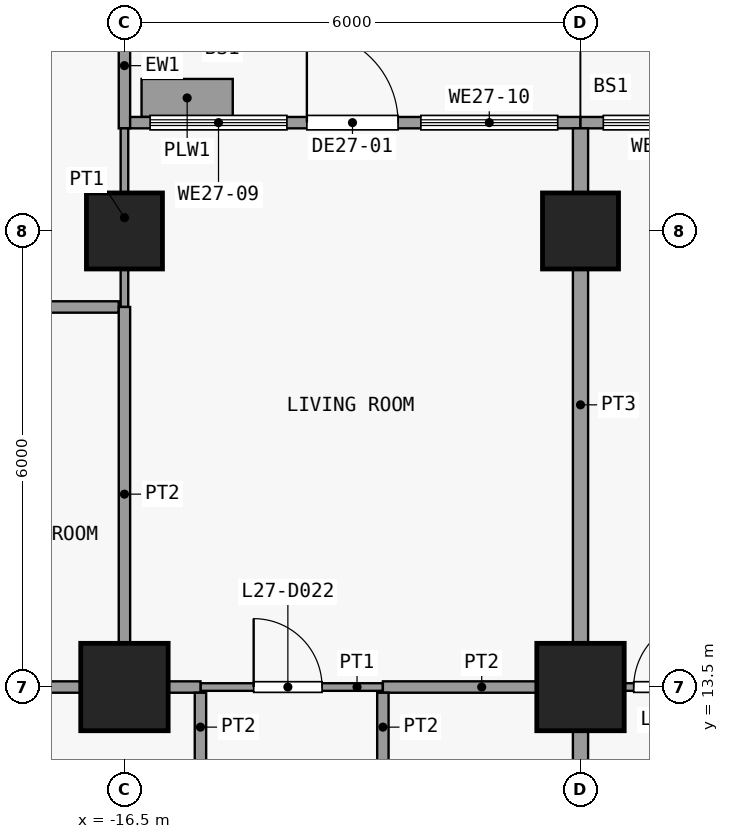
"""IFC4 building model, lengths in metres.
Left out: names, types, materials, properties, quantities, classifications, styles, units other than length and angle.
Written with IfcOpenShell. Run it as: python <this file> out.ifc"""

import sys

from ifc_helpers import new_model, si_unit, direction, frame, frame_2d, origin, origin_2d, place, context, subcontext, project, spatial, rectangle, extrude, element, fill, save


model = new_model("IFC4")
c1 = context("Model", 3, precision=1e-05, world=origin(), true_north=direction((0.0, 1.0)))
c2 = subcontext(c1, "Body", "Model", "MODEL_VIEW")
j1 = project(units=[si_unit("LENGTHUNIT", "METRE"), si_unit("PLANEANGLEUNIT", "RADIAN")], contexts=[c1])
p1 = place(None, origin())
s1 = spatial("IfcSite", under=j1, at=p1, CompositionType="ELEMENT")
p2 = place(p1, origin())
s2 = spatial("IfcBuilding", under=s1, at=p2, CompositionType="ELEMENT")
p3 = place(p2, frame((0.0, 0.0, 109.9)))
s3 = spatial("IfcBuildingStorey", under=s2, at=p3, CompositionType="ELEMENT", Elevation=109.9)
p4 = place(p3, frame((-16.5, 13.5, 0.0), z_axis=(0.0, 0.0, 1.0), x_axis=(1.0, 0.0, 0.0)))
e1 = element("IfcColumn", 1, at=p4, inside=s3, PredefinedType="COLUMN", context=c2, shape_type="SweptSolid", body=[
    extrude(rectangle(XDim=1.15, YDim=1.15, at=origin_2d()), origin(), (0.0, 0.0, 1.0), 3.6),
])
p5 = place(p3, frame((-16.5, 19.5, 0.0), z_axis=(0.0, 0.0, 1.0), x_axis=(1.0, 0.0, 0.0)))
e2 = element("IfcColumn", 2, at=p5, inside=s3, PredefinedType="COLUMN", context=c2, shape_type="SweptSolid", body=[
    extrude(rectangle(XDim=1.0, YDim=1.0, at=origin_2d()), origin(), (0.0, 0.0, 1.0), 3.6),
])
p6 = place(p3, frame((-10.5, 13.5, 0.0), z_axis=(0.0, 0.0, 1.0), x_axis=(1.0, 0.0, 0.0)))
e3 = element("IfcColumn", 3, at=p6, inside=s3, PredefinedType="COLUMN", context=c2, shape_type="SweptSolid", body=[
    extrude(rectangle(XDim=1.15, YDim=1.15, at=origin_2d()), origin(), (0.0, 0.0, 1.0), 3.6),
])
p7 = place(p3, frame((-10.5, 19.5, 0.0), z_axis=(0.0, 0.0, 1.0), x_axis=(1.0, 0.0, 0.0)))
e4 = element("IfcColumn", 4, at=p7, inside=s3, PredefinedType="COLUMN", context=c2, shape_type="SweptSolid", body=[
    extrude(rectangle(XDim=1.0, YDim=1.0, at=origin_2d()), origin(), (0.0, 0.0, 1.0), 3.6),
])
p8 = place(p3, frame((-16.5, 20.85, 0.0), z_axis=(0.0, 0.0, 1.0), x_axis=(0.0, 1.0, 0.0)))
e5 = element("IfcWall", 5, at=p8, inside=s3, PredefinedType="SOLIDWALL", context=c2, shape_type="SweptSolid", body=[
    extrude(rectangle(XDim=1.65, YDim=0.15, at=frame_2d((0.825, 0.0))), origin(), (0.0, 0.0, 1.0), 3.3),
])
p9 = place(p3, frame((-16.425, 20.925, 0.0), z_axis=(0.0, 0.0, 1.0), x_axis=(1.0, 0.0, 0.0)))
e6 = element("IfcWall", 6, at=p9, inside=s3, PredefinedType="SOLIDWALL", context=c2, shape_type="SweptSolid", body=[
    extrude(rectangle(XDim=5.925, YDim=0.15, at=frame_2d((2.962, 0.0))), origin(), (0.0, 0.0, 1.0), 3.3),
])
p10 = place(p9, frame((2.325, 0.0, 0.0)))
e7 = element("IfcOpeningElement", 7, at=p10, cuts=e6, PredefinedType="OPENING", context=c2, shape_type="SweptSolid", body=[
    extrude(rectangle(XDim=1.2, YDim=2.4, at=frame_2d((0.6, 1.2))), frame((0.0, 0.085, 0.0), z_axis=(0.0, -1.0, 0.0), x_axis=(1.0, 0.0, 0.0)), (0.0, 0.0, 1.0), 0.17),
])
p11 = place(p9, frame((0.262, 0.0, 0.9)))
e8 = element("IfcOpeningElement", 8, at=p11, cuts=e6, PredefinedType="OPENING", context=c2, shape_type="SweptSolid", body=[
    extrude(rectangle(XDim=1.8, YDim=2.1, at=frame_2d((0.9, 1.05))), frame((0.0, 0.085, 0.0), z_axis=(0.0, -1.0, 0.0), x_axis=(1.0, 0.0, 0.0)), (0.0, 0.0, 1.0), 0.17),
])
p12 = place(p9, frame((3.825, 0.0, 0.9)))
e9 = element("IfcOpeningElement", 9, at=p12, cuts=e6, PredefinedType="OPENING", context=c2, shape_type="SweptSolid", body=[
    extrude(rectangle(XDim=1.8, YDim=2.1, at=frame_2d((0.9, 1.05))), frame((0.0, 0.085, 0.0), z_axis=(0.0, -1.0, 0.0), x_axis=(1.0, 0.0, 0.0)), (0.0, 0.0, 1.0), 0.17),
])
p13 = place(p3, frame((-16.275, 21.25, 0.0), z_axis=(0.0, 0.0, 1.0), x_axis=(1.0, 0.0, 0.0)))
e10 = element("IfcWall", 10, at=p13, inside=s3, PredefinedType="USERDEFINED", context=c2, shape_type="SweptSolid", body=[
    extrude(rectangle(XDim=1.2, YDim=0.5, at=frame_2d((0.6, 0.0))), origin(), (0.0, 0.0, 1.0), 0.9),
])
p14 = place(p3, frame((-10.5, 20.925, 0.0), z_axis=(0.0, 0.0, 1.0), x_axis=(1.0, 0.0, 0.0)))
e11 = element("IfcWall", 11, at=p14, inside=s3, PredefinedType="SOLIDWALL", context=c2, shape_type="SweptSolid", body=[
    extrude(rectangle(XDim=6.0, YDim=0.15, at=frame_2d((3.0, 0.0))), origin(), (0.0, 0.0, 1.0), 3.3),
])
p15 = place(p14, frame((2.4, 0.0, 0.0)))
e12 = element("IfcOpeningElement", 12, at=p15, cuts=e11, PredefinedType="OPENING", context=c2, shape_type="SweptSolid", body=[
    extrude(rectangle(XDim=1.2, YDim=2.4, at=frame_2d((0.6, 1.2))), frame((0.0, 0.085, 0.0), z_axis=(0.0, -1.0, 0.0), x_axis=(1.0, 0.0, 0.0)), (0.0, 0.0, 1.0), 0.17),
])
p16 = place(p14, frame((0.3, 0.0, 0.9)))
e13 = element("IfcOpeningElement", 13, at=p16, cuts=e11, PredefinedType="OPENING", context=c2, shape_type="SweptSolid", body=[
    extrude(rectangle(XDim=1.8, YDim=2.1, at=frame_2d((0.9, 1.05))), frame((0.0, 0.085, 0.0), z_axis=(0.0, -1.0, 0.0), x_axis=(1.0, 0.0, 0.0)), (0.0, 0.0, 1.0), 0.17),
])
p17 = place(p14, frame((3.9, 0.0, 0.9)))
e14 = element("IfcOpeningElement", 14, at=p17, cuts=e11, PredefinedType="OPENING", context=c2, shape_type="SweptSolid", body=[
    extrude(rectangle(XDim=1.8, YDim=2.1, at=frame_2d((0.9, 1.05))), frame((0.0, 0.085, 0.0), z_axis=(0.0, -1.0, 0.0), x_axis=(1.0, 0.0, 0.0)), (0.0, 0.0, 1.0), 0.17),
])
p18 = place(p3, frame((-15.5, 13.5, 0.0), z_axis=(0.0, 0.0, 1.0), x_axis=(1.0, 0.0, 0.0)))
e15 = element("IfcWall", 15, at=p18, inside=s3, PredefinedType="PARTITIONING", context=c2, shape_type="SweptSolid", body=[
    extrude(rectangle(XDim=2.4, YDim=0.1, at=frame_2d((1.2, 0.0))), origin(), (0.0, 0.0, 1.0), 3.3),
])
p19 = place(p18, frame((0.7, 0.0, 0.0)))
e16 = element("IfcOpeningElement", 16, at=p19, cuts=e15, PredefinedType="OPENING", context=c2, shape_type="SweptSolid", body=[
    extrude(rectangle(XDim=0.9, YDim=2.1, at=frame_2d((0.45, 1.05))), frame((0.0, 0.06, 0.0), z_axis=(0.0, -1.0, 0.0), x_axis=(1.0, 0.0, 0.0)), (0.0, 0.0, 1.0), 0.12),
])
p20 = place(p3, frame((-10.5, 13.5, 0.0), z_axis=(0.0, 0.0, 1.0), x_axis=(1.0, 0.0, 0.0)))
e17 = element("IfcWall", 17, at=p20, inside=s3, PredefinedType="PARTITIONING", context=c2, shape_type="SweptSolid", body=[
    extrude(rectangle(XDim=2.4, YDim=0.1, at=frame_2d((1.2, 0.0))), origin(), (0.0, 0.0, 1.0), 3.3),
])
p21 = place(p20, frame((0.7, 0.0, 0.0)))
e18 = element("IfcOpeningElement", 18, at=p21, cuts=e17, PredefinedType="OPENING", context=c2, shape_type="SweptSolid", body=[
    extrude(rectangle(XDim=0.9, YDim=2.1, at=frame_2d((0.45, 1.05))), frame((0.0, 0.06, 0.0), z_axis=(0.0, -1.0, 0.0), x_axis=(1.0, 0.0, 0.0)), (0.0, 0.0, 1.0), 0.12),
])
p22 = place(p3, frame((-23.85, 13.5, 0.0), z_axis=(0.0, 0.0, 1.0), x_axis=(1.0, 0.0, 0.0)))
e19 = element("IfcWall", 19, at=p22, inside=s3, PredefinedType="PARTITIONING", context=c2, shape_type="SweptSolid", body=[
    extrude(rectangle(XDim=8.35, YDim=0.15, at=frame_2d((4.175, 0.0))), origin(), (0.0, 0.0, 1.0), 3.3),
])
p23 = place(p22, frame((2.0, 0.0, 0.0)))
e20 = element("IfcOpeningElement", 20, at=p23, cuts=e19, PredefinedType="OPENING", context=c2, shape_type="SweptSolid", body=[
    extrude(rectangle(XDim=0.9, YDim=2.1, at=frame_2d((0.45, 1.05))), frame((0.0, 0.085, 0.0), z_axis=(0.0, -1.0, 0.0), x_axis=(1.0, 0.0, 0.0)), (0.0, 0.0, 1.0), 0.17),
])
p24 = place(p3, frame((-13.1, 13.5, 0.0), z_axis=(0.0, 0.0, 1.0), x_axis=(1.0, 0.0, 0.0)))
e21 = element("IfcWall", 21, at=p24, inside=s3, PredefinedType="PARTITIONING", context=c2, shape_type="SweptSolid", body=[
    extrude(rectangle(XDim=2.6, YDim=0.15, at=frame_2d((1.3, 0.0))), origin(), (0.0, 0.0, 1.0), 3.3),
])
p25 = place(p3, frame((-19.8, 18.5, 0.0), z_axis=(0.0, 0.0, 1.0), x_axis=(1.0, 0.0, 0.0)))
e22 = element("IfcWall", 22, at=p25, inside=s3, PredefinedType="PARTITIONING", context=c2, shape_type="SweptSolid", body=[
    extrude(rectangle(XDim=3.225, YDim=0.15, at=frame_2d((1.613, 0.0))), origin(), (0.0, 0.0, 1.0), 3.3),
])
p26 = place(p25, frame((1.2, 0.0, 0.0)))
e23 = element("IfcOpeningElement", 23, at=p26, cuts=e22, PredefinedType="OPENING", context=c2, shape_type="SweptSolid", body=[
    extrude(rectangle(XDim=0.9, YDim=2.1, at=frame_2d((0.45, 1.05))), frame((0.0, 0.085, 0.0), z_axis=(0.0, -1.0, 0.0), x_axis=(1.0, 0.0, 0.0)), (0.0, 0.0, 1.0), 0.17),
])
p27 = place(p3, frame((-16.5, 18.5, 0.0), z_axis=(0.0, 0.0, 1.0), x_axis=(0.0, 1.0, 0.0)))
e24 = element("IfcWall", 24, at=p27, inside=s3, PredefinedType="PARTITIONING", context=c2, shape_type="SweptSolid", body=[
    extrude(rectangle(XDim=2.35, YDim=0.1, at=frame_2d((1.175, 0.0))), origin(), (0.0, 0.0, 1.0), 3.3),
])
p28 = place(p3, frame((-16.5, 13.575, 0.0), z_axis=(0.0, 0.0, 1.0), x_axis=(0.0, 1.0, 0.0)))
e25 = element("IfcWall", 25, at=p28, inside=s3, PredefinedType="PARTITIONING", context=c2, shape_type="SweptSolid", body=[
    extrude(rectangle(XDim=4.925, YDim=0.15, at=frame_2d((2.462, 0.0))), origin(), (0.0, 0.0, 1.0), 3.3),
])
p29 = place(p3, frame((-15.5, 10.6, 0.0), z_axis=(0.0, 0.0, 1.0), x_axis=(0.0, 1.0, 0.0)))
e26 = element("IfcWall", 26, at=p29, inside=s3, PredefinedType="PARTITIONING", context=c2, shape_type="SweptSolid", body=[
    extrude(rectangle(XDim=2.825, YDim=0.15, at=frame_2d((1.413, 0.0))), origin(), (0.0, 0.0, 1.0), 3.3),
])
p30 = place(p29, frame((0.9, 0.0, 0.0)))
e27 = element("IfcOpeningElement", 27, at=p30, cuts=e26, PredefinedType="OPENING", context=c2, shape_type="SweptSolid", body=[
    extrude(rectangle(XDim=0.9, YDim=2.1, at=frame_2d((0.45, 1.05))), frame((0.0, 0.085, 0.0), z_axis=(0.0, -1.0, 0.0), x_axis=(1.0, 0.0, 0.0)), (0.0, 0.0, 1.0), 0.17),
])
p31 = place(p3, frame((-13.1, 10.6, 0.0), z_axis=(0.0, 0.0, 1.0), x_axis=(0.0, 1.0, 0.0)))
e28 = element("IfcWall", 28, at=p31, inside=s3, PredefinedType="PARTITIONING", context=c2, shape_type="SweptSolid", body=[
    extrude(rectangle(XDim=2.825, YDim=0.15, at=frame_2d((1.413, 0.0))), origin(), (0.0, 0.0, 1.0), 3.3),
])
p32 = place(p31, frame((0.9, 0.0, 0.0)))
e29 = element("IfcOpeningElement", 29, at=p32, cuts=e28, PredefinedType="OPENING", context=c2, shape_type="SweptSolid", body=[
    extrude(rectangle(XDim=0.9, YDim=2.1, at=frame_2d((0.45, 1.05))), frame((0.0, 0.085, 0.0), z_axis=(0.0, -1.0, 0.0), x_axis=(1.0, 0.0, 0.0)), (0.0, 0.0, 1.0), 0.17),
])
p33 = place(p3, frame((-10.5, 10.6, 0.0), z_axis=(0.0, 0.0, 1.0), x_axis=(0.0, 1.0, 0.0)))
e30 = element("IfcWall", 30, at=p33, inside=s3, PredefinedType="PARTITIONING", context=c2, shape_type="SweptSolid", body=[
    extrude(rectangle(XDim=2.825, YDim=0.2, at=frame_2d((1.413, 0.0))), origin(), (0.0, 0.0, 1.0), 3.3),
])
p34 = place(p3, frame((-10.5, 13.575, 0.0), z_axis=(0.0, 0.0, 1.0), x_axis=(0.0, 1.0, 0.0)))
e31 = element("IfcWall", 31, at=p34, inside=s3, PredefinedType="PARTITIONING", context=c2, shape_type="SweptSolid", body=[
    extrude(rectangle(XDim=7.275, YDim=0.2, at=frame_2d((3.638, 0.0))), origin(), (0.0, 0.0, 1.0), 3.3),
])
p35 = place(p10, origin())
e32 = element("IfcDoor", 32, at=p35, inside=s3, OperationType="SINGLE_SWING_LEFT", PredefinedType="DOOR", context=c2, shape_type="SweptSolid", body=[
    extrude(rectangle(XDim=1.2, YDim=2.4, at=frame_2d((0.6, 1.2))), frame((0.0, 0.025, 0.0), z_axis=(0.0, -1.0, 0.0), x_axis=(1.0, 0.0, 0.0)), (0.0, 0.0, 1.0), 0.05),
])
fill(e7, e32)
p36 = place(p11, origin())
e33 = element("IfcWindow", 33, at=p36, inside=s3, PartitioningType="SINGLE_PANEL", PredefinedType="WINDOW", context=c2, shape_type="SweptSolid", body=[
    extrude(rectangle(XDim=1.8, YDim=2.1, at=frame_2d((0.9, 1.05))), frame((0.0, 0.03, 0.0), z_axis=(0.0, -1.0, 0.0), x_axis=(1.0, 0.0, 0.0)), (0.0, 0.0, 1.0), 0.06),
])
fill(e8, e33)
p37 = place(p12, origin())
e34 = element("IfcWindow", 34, at=p37, inside=s3, PartitioningType="SINGLE_PANEL", PredefinedType="WINDOW", context=c2, shape_type="SweptSolid", body=[
    extrude(rectangle(XDim=1.8, YDim=2.1, at=frame_2d((0.9, 1.05))), frame((0.0, 0.03, 0.0), z_axis=(0.0, -1.0, 0.0), x_axis=(1.0, 0.0, 0.0)), (0.0, 0.0, 1.0), 0.06),
])
fill(e9, e34)
p38 = place(p16, origin())
e35 = element("IfcWindow", 35, at=p38, inside=s3, PartitioningType="SINGLE_PANEL", PredefinedType="WINDOW", context=c2, shape_type="SweptSolid", body=[
    extrude(rectangle(XDim=1.8, YDim=2.1, at=frame_2d((0.9, 1.05))), frame((0.0, 0.03, 0.0), z_axis=(0.0, -1.0, 0.0), x_axis=(1.0, 0.0, 0.0)), (0.0, 0.0, 1.0), 0.06),
])
fill(e13, e35)
p39 = place(p19, origin())
e36 = element("IfcDoor", 36, at=p39, inside=s3, OperationType="SINGLE_SWING_RIGHT", PredefinedType="DOOR", context=c2, shape_type="SweptSolid", body=[
    extrude(rectangle(XDim=0.9, YDim=2.1, at=frame_2d((0.45, 1.05))), frame((0.0, 0.025, 0.0), z_axis=(0.0, -1.0, 0.0), x_axis=(1.0, 0.0, 0.0)), (0.0, 0.0, 1.0), 0.05),
])
fill(e16, e36)
p40 = place(p21, origin())
e37 = element("IfcDoor", 37, at=p40, inside=s3, OperationType="SINGLE_SWING_LEFT", PredefinedType="DOOR", context=c2, shape_type="SweptSolid", body=[
    extrude(rectangle(XDim=0.9, YDim=2.1, at=frame_2d((0.45, 1.05))), frame((0.0, 0.025, 0.0), z_axis=(0.0, -1.0, 0.0), x_axis=(1.0, 0.0, 0.0)), (0.0, 0.0, 1.0), 0.05),
])
fill(e18, e37)
save(model, sys.argv[1])
